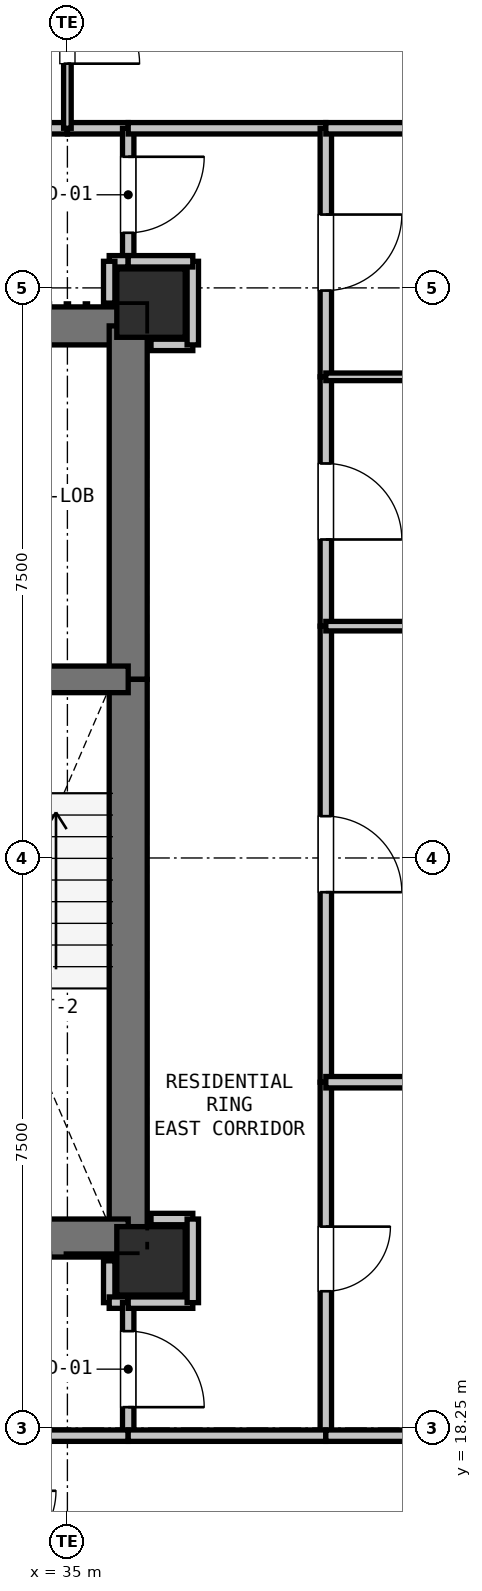
"""IFC4 building model, lengths in metres.
Left out: names, types, materials, properties, quantities, classifications, styles, units other than length and angle.
Written with IfcOpenShell. Run it as: python <this file> out.ifc"""

import sys

from ifc_helpers import new_model, si_unit, direction, frame, frame_2d, origin, origin_2d, place, context, subcontext, project, spatial, rectangle, extrude, element, fill, save


model = new_model("IFC4")
c1 = context("Model", 3, precision=1e-05, world=origin(), true_north=direction((0.0, 1.0)))
c2 = subcontext(c1, "Body", "Model", "MODEL_VIEW")
j1 = project(units=[si_unit("LENGTHUNIT", "METRE"), si_unit("PLANEANGLEUNIT", "RADIAN")], contexts=[c1])
p1 = place(None, origin())
s1 = spatial("IfcSite", under=j1, at=p1, CompositionType="ELEMENT")
p2 = place(p1, origin())
s2 = spatial("IfcBuilding", under=s1, at=p2, CompositionType="ELEMENT")
p3 = place(p2, frame((0.0, 0.0, 42.3)))
s3 = spatial("IfcBuildingStorey", under=s2, at=p3, CompositionType="ELEMENT", Elevation=42.3)
for number, where, z_axis, x_axis in (
    (1, (36.1, 33.05, 0.0), (0.0, 0.0, 1.0), (1.0, 0.0, 0.0)),
    (2, (36.1, 20.45, 0.0), (0.0, 0.0, 1.0), (1.0, 0.0, 0.0)),
):
    element("IfcColumn", number, at=place(p3, frame(where, z_axis=z_axis, x_axis=x_axis)), inside=s3, PredefinedType="COLUMN", context=c2, shape_type="SweptSolid", body=[
        extrude(rectangle(XDim=0.9, YDim=0.9, at=origin_2d()), origin(), (0.0, 0.0, 1.0), 3.3),
    ])
p4 = place(p3, frame((32.35, 32.75, 0.0), z_axis=(0.0, 0.0, 1.0), x_axis=(1.0, 0.0, 0.0)))
e3 = element("IfcWall", 3, at=p4, inside=s3, PredefinedType="SHEAR", context=c2, shape_type="SweptSolid", body=[
    extrude(rectangle(XDim=3.45, YDim=0.5, at=frame_2d((1.725, 0.0))), origin(), (0.0, 0.0, 1.0), 3.04),
])
p5 = place(p4, frame((0.65, 0.0, 0.0)))
e4 = element("IfcOpeningElement", 4, at=p5, cuts=e3, PredefinedType="OPENING", context=c2, shape_type="SweptSolid", body=[
    extrude(rectangle(XDim=1.15, YDim=2.15, at=frame_2d((0.575, 1.075))), frame((0.0, 0.26, 0.0), z_axis=(0.0, -1.0, 0.0), x_axis=(1.0, 0.0, 0.0)), (0.0, 0.0, 1.0), 0.52),
])
p6 = place(p3, frame((35.8, 32.75, 0.0), z_axis=(0.0, 0.0, 1.0), x_axis=(0.0, -1.0, 0.0)))
e5 = element("IfcWall", 5, at=p6, inside=s3, PredefinedType="SHEAR", context=c2, shape_type="SweptSolid", body=[
    extrude(rectangle(XDim=4.65, YDim=0.5, at=frame_2d((2.325, 0.0))), origin(), (0.0, 0.0, 1.0), 3.04),
])
p7 = place(p3, frame((35.8, 28.1, 0.0), z_axis=(0.0, 0.0, 1.0), x_axis=(0.0, -1.0, 0.0)))
e6 = element("IfcWall", 6, at=p7, inside=s3, PredefinedType="SHEAR", context=c2, shape_type="SweptSolid", body=[
    extrude(rectangle(XDim=7.35, YDim=0.5, at=frame_2d((3.675, 0.0))), origin(), (0.0, 0.0, 1.0), 3.04),
])
p8 = place(p3, frame((35.8, 20.75, 0.0), z_axis=(0.0, 0.0, 1.0), x_axis=(-1.0, 0.0, 0.0)))
e7 = element("IfcWall", 7, at=p8, inside=s3, PredefinedType="SHEAR", context=c2, shape_type="SweptSolid", body=[
    extrude(rectangle(XDim=3.45, YDim=0.5, at=frame_2d((1.725, 0.0))), origin(), (0.0, 0.0, 1.0), 3.04),
])
p9 = place(p3, frame((32.35, 28.1, 0.0), z_axis=(0.0, 0.0, 1.0), x_axis=(1.0, 0.0, 0.0)))
e8 = element("IfcWall", 8, at=p9, inside=s3, PredefinedType="SHEAR", context=c2, shape_type="SweptSolid", body=[
    extrude(rectangle(XDim=3.45, YDim=0.35, at=frame_2d((1.725, 0.0))), origin(), (0.0, 0.0, 1.0), 3.04),
])
p10 = place(p9, frame((1.15, 0.0, 0.0)))
e9 = element("IfcOpeningElement", 9, at=p10, cuts=e8, PredefinedType="OPENING", context=c2, shape_type="SweptSolid", body=[
    extrude(rectangle(XDim=1.15, YDim=2.15, at=frame_2d((0.575, 1.075))), frame((0.0, 0.185, 0.0), z_axis=(0.0, -1.0, 0.0), x_axis=(1.0, 0.0, 0.0)), (0.0, 0.0, 1.0), 0.37),
])
p11 = place(p3, frame((35.55, 20.45, 0.0), z_axis=(0.0, 0.0, 1.0), x_axis=(0.0, -1.0, 0.0)))
e10 = element("IfcWall", 10, at=p11, inside=s3, PredefinedType="PARTITIONING", context=c2, shape_type="SweptSolid", body=[
    extrude(rectangle(XDim=0.55, YDim=0.15, at=frame_2d((0.275, 0.0))), origin(), (0.0, 0.0, 1.0), 2.488),
])
p12 = place(p3, frame((35.55, 19.9, 0.0), z_axis=(0.0, 0.0, 1.0), x_axis=(1.0, 0.0, 0.0)))
e11 = element("IfcWall", 11, at=p12, inside=s3, PredefinedType="PARTITIONING", context=c2, shape_type="SweptSolid", body=[
    extrude(rectangle(XDim=0.25, YDim=0.15, at=frame_2d((0.125, 0.0))), origin(), (0.0, 0.0, 1.0), 3.04),
])
p13 = place(p3, frame((35.8, 19.9, 0.0), z_axis=(0.0, 0.0, 1.0), x_axis=(0.0, -1.0, 0.0)))
e12 = element("IfcWall", 12, at=p13, inside=s3, PredefinedType="PARTITIONING", context=c2, shape_type="SweptSolid", body=[
    extrude(rectangle(XDim=1.75, YDim=0.15, at=frame_2d((0.875, 0.0))), origin(), (0.0, 0.0, 1.0), 3.04),
])
p14 = place(p13, frame((0.375, 0.0, 0.0)))
e13 = element("IfcOpeningElement", 13, at=p14, cuts=e12, PredefinedType="OPENING", context=c2, shape_type="SweptSolid", body=[
    extrude(rectangle(XDim=1.0, YDim=2.15, at=frame_2d((0.5, 1.075))), frame((0.0, 0.085, 0.0), z_axis=(0.0, -1.0, 0.0), x_axis=(1.0, 0.0, 0.0)), (0.0, 0.0, 1.0), 0.17),
])
p15 = place(p3, frame((35.8, 18.15, 0.0), z_axis=(0.0, 0.0, 1.0), x_axis=(-1.0, 0.0, 0.0)))
e14 = element("IfcWall", 14, at=p15, inside=s3, PredefinedType="PARTITIONING", context=c2, shape_type="SweptSolid", body=[
    extrude(rectangle(XDim=1.9, YDim=0.15, at=frame_2d((0.95, 0.0))), origin(), (0.0, 0.0, 1.0), 3.04),
])
p16 = place(p3, frame((32.5, 35.35, 0.0), z_axis=(0.0, 0.0, 1.0), x_axis=(1.0, 0.0, 0.0)))
e15 = element("IfcWall", 15, at=p16, inside=s3, PredefinedType="PARTITIONING", context=c2, shape_type="SweptSolid", body=[
    extrude(rectangle(XDim=2.5, YDim=0.15, at=frame_2d((1.25, 0.0))), origin(), (0.0, 0.0, 1.0), 3.04),
])
p17 = place(p16, frame((0.75, 0.0, 0.0)))
e16 = element("IfcOpeningElement", 16, at=p17, cuts=e15, PredefinedType="OPENING", context=c2, shape_type="SweptSolid", body=[
    extrude(rectangle(XDim=1.0, YDim=2.15, at=frame_2d((0.5, 1.075))), frame((0.0, 0.085, 0.0), z_axis=(0.0, -1.0, 0.0), x_axis=(1.0, 0.0, 0.0)), (0.0, 0.0, 1.0), 0.17),
])
p18 = place(p3, frame((35.0, 35.35, 0.0), z_axis=(0.0, 0.0, 1.0), x_axis=(1.0, 0.0, 0.0)))
e17 = element("IfcWall", 17, at=p18, inside=s3, PredefinedType="PARTITIONING", context=c2, shape_type="SweptSolid", body=[
    extrude(rectangle(XDim=0.8, YDim=0.15, at=frame_2d((0.4, 0.0))), origin(), (0.0, 0.0, 1.0), 3.04),
])
p19 = place(p3, frame((35.8, 35.35, 0.0), z_axis=(0.0, 0.0, 1.0), x_axis=(0.0, -1.0, 0.0)))
e18 = element("IfcWall", 18, at=p19, inside=s3, PredefinedType="PARTITIONING", context=c2, shape_type="SweptSolid", body=[
    extrude(rectangle(XDim=1.75, YDim=0.15, at=frame_2d((0.875, 0.0))), origin(), (0.0, 0.0, 1.0), 3.04),
])
p20 = place(p19, frame((0.375, 0.0, 0.0)))
e19 = element("IfcOpeningElement", 19, at=p20, cuts=e18, PredefinedType="OPENING", context=c2, shape_type="SweptSolid", body=[
    extrude(rectangle(XDim=1.0, YDim=2.15, at=frame_2d((0.5, 1.075))), frame((0.0, 0.085, 0.0), z_axis=(0.0, -1.0, 0.0), x_axis=(1.0, 0.0, 0.0)), (0.0, 0.0, 1.0), 0.17),
])
p21 = place(p3, frame((35.8, 33.6, 0.0), z_axis=(0.0, 0.0, 1.0), x_axis=(-1.0, 0.0, 0.0)))
e20 = element("IfcWall", 20, at=p21, inside=s3, PredefinedType="PARTITIONING", context=c2, shape_type="SweptSolid", body=[
    extrude(rectangle(XDim=0.25, YDim=0.15, at=frame_2d((0.125, 0.0))), origin(), (0.0, 0.0, 1.0), 3.04),
])
p22 = place(p3, frame((35.55, 33.6, 0.0), z_axis=(0.0, 0.0, 1.0), x_axis=(0.0, -1.0, 0.0)))
e21 = element("IfcWall", 21, at=p22, inside=s3, PredefinedType="PARTITIONING", context=c2, shape_type="SweptSolid", body=[
    extrude(rectangle(XDim=0.55, YDim=0.15, at=frame_2d((0.275, 0.0))), origin(), (0.0, 0.0, 1.0), 2.488),
])
for number, where, z_axis, x_axis in (
    (22, (36.65, 21.0, 0.0), (0.0, 0.0, 1.0), (-1.0, 0.0, 0.0)),
    (23, (36.1, 32.5, 0.0), (0.0, 0.0, 1.0), (1.0, 0.0, 0.0)),
):
    element("IfcWall", number, at=place(p3, frame(where, z_axis=z_axis, x_axis=x_axis)), inside=s3, PredefinedType="PARTITIONING", context=c2, shape_type="SweptSolid", body=[
        extrude(rectangle(XDim=0.55, YDim=0.15, at=frame_2d((0.275, 0.0))), origin(), (0.0, 0.0, 1.0), 2.488),
    ])
p23 = place(p3, frame((36.65, 32.5, 0.0), z_axis=(0.0, 0.0, 1.0), x_axis=(0.0, 1.0, 0.0)))
e24 = element("IfcWall", 24, at=p23, inside=s3, PredefinedType="PARTITIONING", context=c2, shape_type="SweptSolid", body=[
    extrude(rectangle(XDim=1.1, YDim=0.15, at=frame_2d((0.55, 0.0))), origin(), (0.0, 0.0, 1.0), 2.337),
])
p24 = place(p3, frame((36.65, 33.6, 0.0), z_axis=(0.0, 0.0, 1.0), x_axis=(-1.0, 0.0, 0.0)))
e25 = element("IfcWall", 25, at=p24, inside=s3, PredefinedType="PARTITIONING", context=c2, shape_type="SweptSolid", body=[
    extrude(rectangle(XDim=0.85, YDim=0.15, at=frame_2d((0.425, 0.0))), origin(), (0.0, 0.0, 1.0), 2.337),
])
p25 = place(p3, frame((35.8, 35.35, 0.0), z_axis=(0.0, 0.0, 1.0), x_axis=(1.0, 0.0, 0.0)))
e26 = element("IfcWall", 26, at=p25, inside=s3, PredefinedType="PARTITIONING", context=c2, shape_type="SweptSolid", body=[
    extrude(rectangle(XDim=2.6, YDim=0.15, at=frame_2d((1.3, 0.0))), origin(), (0.0, 0.0, 1.0), 2.337),
])
p26 = place(p3, frame((38.4, 35.35, 0.0), z_axis=(0.0, 0.0, 1.0), x_axis=(0.0, -1.0, 0.0)))
e27 = element("IfcWall", 27, at=p26, inside=s3, PredefinedType="PARTITIONING", context=c2, shape_type="SweptSolid", body=[
    extrude(rectangle(XDim=3.27, YDim=0.15, at=frame_2d((1.635, 0.0))), origin(), (0.0, 0.0, 1.0), 2.337),
])
p27 = place(p26, frame((1.135, 0.0, 0.0)))
e28 = element("IfcOpeningElement", 28, at=p27, cuts=e27, PredefinedType="OPENING", context=c2, shape_type="SweptSolid", body=[
    extrude(rectangle(XDim=1.0, YDim=2.15, at=frame_2d((0.5, 1.075))), frame((0.0, 0.085, 0.0), z_axis=(0.0, -1.0, 0.0), x_axis=(1.0, 0.0, 0.0)), (0.0, 0.0, 1.0), 0.17),
])
p28 = place(p3, frame((38.4, 32.08, 0.0), z_axis=(0.0, 0.0, 1.0), x_axis=(0.0, -1.0, 0.0)))
e29 = element("IfcWall", 29, at=p28, inside=s3, PredefinedType="PARTITIONING", context=c2, shape_type="SweptSolid", body=[
    extrude(rectangle(XDim=3.28, YDim=0.15, at=frame_2d((1.64, 0.0))), origin(), (0.0, 0.0, 1.0), 3.04),
])
p29 = place(p28, frame((1.14, 0.0, 0.0)))
e30 = element("IfcOpeningElement", 30, at=p29, cuts=e29, PredefinedType="OPENING", context=c2, shape_type="SweptSolid", body=[
    extrude(rectangle(XDim=1.0, YDim=2.15, at=frame_2d((0.5, 1.075))), frame((0.0, 0.085, 0.0), z_axis=(0.0, -1.0, 0.0), x_axis=(1.0, 0.0, 0.0)), (0.0, 0.0, 1.0), 0.17),
])
p30 = place(p3, frame((38.4, 28.8, 0.0), z_axis=(0.0, 0.0, 1.0), x_axis=(0.0, -1.0, 0.0)))
e31 = element("IfcWall", 31, at=p30, inside=s3, PredefinedType="PARTITIONING", context=c2, shape_type="SweptSolid", body=[
    extrude(rectangle(XDim=6.0, YDim=0.15, at=frame_2d((3.0, 0.0))), origin(), (0.0, 0.0, 1.0), 3.04),
])
p31 = place(p30, frame((2.5, 0.0, 0.0)))
e32 = element("IfcOpeningElement", 32, at=p31, cuts=e31, PredefinedType="OPENING", context=c2, shape_type="SweptSolid", body=[
    extrude(rectangle(XDim=1.0, YDim=2.15, at=frame_2d((0.5, 1.075))), frame((0.0, 0.085, 0.0), z_axis=(0.0, -1.0, 0.0), x_axis=(1.0, 0.0, 0.0)), (0.0, 0.0, 1.0), 0.17),
])
p32 = place(p3, frame((38.4, 22.8, 0.0), z_axis=(0.0, 0.0, 1.0), x_axis=(0.0, -1.0, 0.0)))
e33 = element("IfcWall", 33, at=p32, inside=s3, PredefinedType="PARTITIONING", context=c2, shape_type="SweptSolid", body=[
    extrude(rectangle(XDim=4.65, YDim=0.15, at=frame_2d((2.325, 0.0))), origin(), (0.0, 0.0, 1.0), 3.04),
])
p33 = place(p32, frame((1.9, 0.0, 0.0)))
e34 = element("IfcOpeningElement", 34, at=p33, cuts=e33, PredefinedType="OPENING", context=c2, shape_type="SweptSolid", body=[
    extrude(rectangle(XDim=0.85, YDim=2.1, at=frame_2d((0.425, 1.05))), frame((0.0, 0.085, 0.0), z_axis=(0.0, -1.0, 0.0), x_axis=(1.0, 0.0, 0.0)), (0.0, 0.0, 1.0), 0.17),
])
p34 = place(p3, frame((38.4, 18.15, 0.0), z_axis=(0.0, 0.0, 1.0), x_axis=(-1.0, 0.0, 0.0)))
e35 = element("IfcWall", 35, at=p34, inside=s3, PredefinedType="PARTITIONING", context=c2, shape_type="SweptSolid", body=[
    extrude(rectangle(XDim=2.6, YDim=0.15, at=frame_2d((1.3, 0.0))), origin(), (0.0, 0.0, 1.0), 2.337),
])
p35 = place(p3, frame((35.8, 19.9, 0.0), z_axis=(0.0, 0.0, 1.0), x_axis=(1.0, 0.0, 0.0)))
e36 = element("IfcWall", 36, at=p35, inside=s3, PredefinedType="PARTITIONING", context=c2, shape_type="SweptSolid", body=[
    extrude(rectangle(XDim=0.85, YDim=0.15, at=frame_2d((0.425, 0.0))), origin(), (0.0, 0.0, 1.0), 2.337),
])
p36 = place(p3, frame((36.65, 19.9, 0.0), z_axis=(0.0, 0.0, 1.0), x_axis=(0.0, 1.0, 0.0)))
e37 = element("IfcWall", 37, at=p36, inside=s3, PredefinedType="PARTITIONING", context=c2, shape_type="SweptSolid", body=[
    extrude(rectangle(XDim=1.1, YDim=0.15, at=frame_2d((0.55, 0.0))), origin(), (0.0, 0.0, 1.0), 3.04),
])
p37 = place(p3, frame((35.0, 38.0, 0.0), z_axis=(0.0, 0.0, 1.0), x_axis=(0.0, -1.0, 0.0)))
e38 = element("IfcWall", 38, at=p37, inside=s3, PredefinedType="PARTITIONING", context=c2, shape_type="SweptSolid", body=[
    extrude(rectangle(XDim=2.65, YDim=0.1, at=frame_2d((1.325, 0.0))), origin(), (0.0, 0.0, 1.0), 3.04),
])
p38 = place(p37, frame((0.85, 0.0, 0.0)))
e39 = element("IfcOpeningElement", 39, at=p38, cuts=e38, PredefinedType="OPENING", context=c2, shape_type="SweptSolid", body=[
    extrude(rectangle(XDim=0.95, YDim=2.1, at=frame_2d((0.475, 1.05))), frame((0.0, 0.06, 0.0), z_axis=(0.0, -1.0, 0.0), x_axis=(1.0, 0.0, 0.0)), (0.0, 0.0, 1.0), 0.12),
])
p39 = place(p3, frame((43.688, 35.35, 0.0), z_axis=(0.0, 0.0, 1.0), x_axis=(-1.0, 0.0, 0.0)))
e40 = element("IfcWall", 40, at=p39, inside=s3, PredefinedType="PARTITIONING", context=c2, shape_type="SweptSolid", body=[
    extrude(rectangle(XDim=5.289, YDim=0.15, at=frame_2d((2.644, 0.0))), origin(), (0.0, 0.0, 1.0), 2.337),
])
p40 = place(p3, frame((38.4, 18.15, 0.0), z_axis=(0.0, 0.0, 1.0), x_axis=(1.0, 0.0, 0.0)))
e41 = element("IfcWall", 41, at=p40, inside=s3, PredefinedType="PARTITIONING", context=c2, shape_type="SweptSolid", body=[
    extrude(rectangle(XDim=5.289, YDim=0.15, at=frame_2d((2.644, 0.0))), origin(), (0.0, 0.0, 1.0), 2.365),
])
p41 = place(p3, frame((38.4, 32.08, 0.0), z_axis=(0.0, 0.0, 1.0), x_axis=(1.0, 0.0, 0.0)))
e42 = element("IfcWall", 42, at=p41, inside=s3, PredefinedType="PARTITIONING", context=c2, shape_type="SweptSolid", body=[
    extrude(rectangle(XDim=5.414, YDim=0.1, at=frame_2d((2.707, 0.0))), origin(), (0.0, 0.0, 1.0), 2.365),
])
p42 = place(p3, frame((43.814, 28.8, 0.0), z_axis=(0.0, 0.0, 1.0), x_axis=(-1.0, 0.0, 0.0)))
e43 = element("IfcWall", 43, at=p42, inside=s3, PredefinedType="PARTITIONING", context=c2, shape_type="SweptSolid", body=[
    extrude(rectangle(XDim=5.414, YDim=0.125, at=frame_2d((2.707, 0.0))), origin(), (0.0, 0.0, 1.0), 2.365),
])
p43 = place(p3, frame((43.814, 22.8, 0.0), z_axis=(0.0, 0.0, 1.0), x_axis=(-1.0, 0.0, 0.0)))
e44 = element("IfcWall", 44, at=p43, inside=s3, PredefinedType="PARTITIONING", context=c2, shape_type="SweptSolid", body=[
    extrude(rectangle(XDim=5.414, YDim=0.15, at=frame_2d((2.707, 0.0))), origin(), (0.0, 0.0, 1.0), 2.365),
])
p44 = place(p14, origin())
e45 = element("IfcDoor", 45, at=p44, inside=s3, OperationType="SINGLE_SWING_RIGHT", PredefinedType="DOOR", context=c2, shape_type="SweptSolid", body=[
    extrude(rectangle(XDim=1.0, YDim=2.15, at=frame_2d((0.5, 1.075))), frame((0.0, 0.025, 0.0), z_axis=(0.0, -1.0, 0.0), x_axis=(1.0, 0.0, 0.0)), (0.0, 0.0, 1.0), 0.05),
])
fill(e13, e45)
p45 = place(p20, origin())
e46 = element("IfcDoor", 46, at=p45, inside=s3, OperationType="SINGLE_SWING_LEFT", PredefinedType="DOOR", context=c2, shape_type="SweptSolid", body=[
    extrude(rectangle(XDim=1.0, YDim=2.15, at=frame_2d((0.5, 1.075))), frame((0.0, 0.025, 0.0), z_axis=(0.0, -1.0, 0.0), x_axis=(1.0, 0.0, 0.0)), (0.0, 0.0, 1.0), 0.05),
])
fill(e19, e46)
p46 = place(p29, origin())
e47 = element("IfcDoor", 47, at=p46, inside=s3, OperationType="SINGLE_SWING_RIGHT", PredefinedType="DOOR", context=c2, shape_type="SweptSolid", body=[
    extrude(rectangle(XDim=1.0, YDim=2.15, at=frame_2d((0.5, 1.075))), frame((0.0, 0.025, 0.0), z_axis=(0.0, -1.0, 0.0), x_axis=(1.0, 0.0, 0.0)), (0.0, 0.0, 1.0), 0.05),
])
fill(e30, e47)
p47 = place(p27, origin())
e48 = element("IfcDoor", 48, at=p47, inside=s3, OperationType="SINGLE_SWING_LEFT", PredefinedType="DOOR", context=c2, shape_type="SweptSolid", body=[
    extrude(rectangle(XDim=1.0, YDim=2.15, at=frame_2d((0.5, 1.075))), frame((0.0, 0.025, 0.0), z_axis=(0.0, -1.0, 0.0), x_axis=(1.0, 0.0, 0.0)), (0.0, 0.0, 1.0), 0.05),
])
fill(e28, e48)
p48 = place(p31, origin())
e49 = element("IfcDoor", 49, at=p48, inside=s3, OperationType="SINGLE_SWING_RIGHT", PredefinedType="DOOR", context=c2, shape_type="SweptSolid", body=[
    extrude(rectangle(XDim=1.0, YDim=2.15, at=frame_2d((0.5, 1.075))), frame((0.0, 0.025, 0.0), z_axis=(0.0, -1.0, 0.0), x_axis=(1.0, 0.0, 0.0)), (0.0, 0.0, 1.0), 0.05),
])
fill(e32, e49)
p49 = place(p33, origin())
e50 = element("IfcDoor", 50, at=p49, inside=s3, OperationType="SINGLE_SWING_LEFT", PredefinedType="DOOR", context=c2, shape_type="SweptSolid", body=[
    extrude(rectangle(XDim=0.85, YDim=2.1, at=frame_2d((0.425, 1.05))), frame((0.0, 0.025, 0.0), z_axis=(0.0, -1.0, 0.0), x_axis=(1.0, 0.0, 0.0)), (0.0, 0.0, 1.0), 0.05),
])
fill(e34, e50)
p50 = place(p38, origin())
e51 = element("IfcDoor", 51, at=p50, inside=s3, OperationType="SINGLE_SWING_RIGHT", PredefinedType="DOOR", context=c2, shape_type="SweptSolid", body=[
    extrude(rectangle(XDim=0.95, YDim=2.1, at=frame_2d((0.475, 1.05))), frame((0.0, 0.025, 0.0), z_axis=(0.0, -1.0, 0.0), x_axis=(1.0, 0.0, 0.0)), (0.0, 0.0, 1.0), 0.05),
])
fill(e39, e51)
save(model, sys.argv[1])
